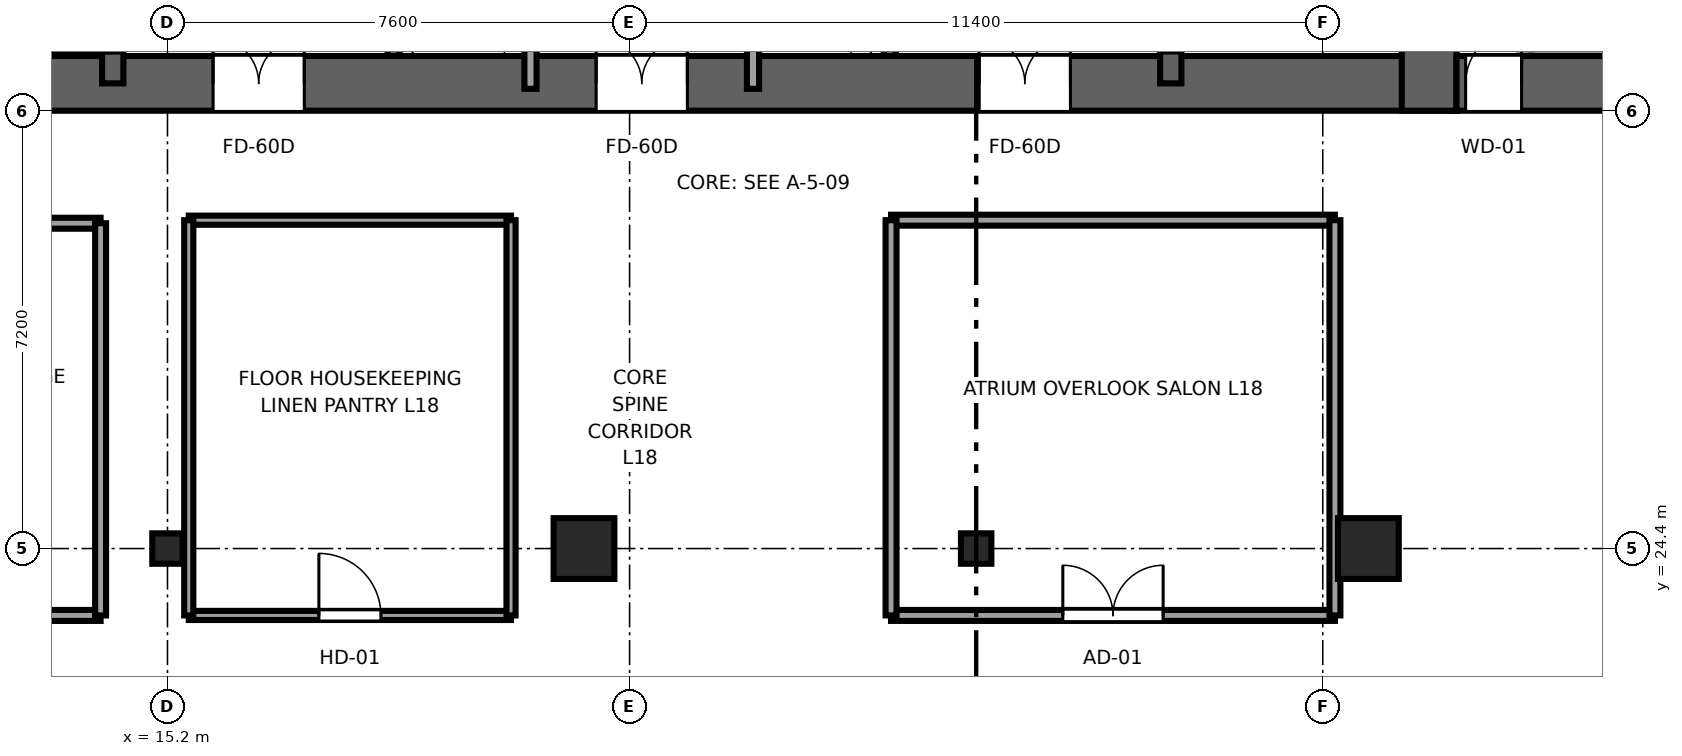
"""IFC4 building model, lengths in metres.
Left out: names, types, materials, properties, quantities, classifications, styles, units other than length and angle.
Written with IfcOpenShell. Run it as: python <this file> out.ifc"""

import sys

from ifc_helpers import new_model, si_unit, direction, frame, frame_2d, origin, origin_2d, place, context, subcontext, project, spatial, rectangle, i_section, extrude, source, transform, mapped, element, fill, save


model = new_model("IFC4")
c1 = context("Model", 3, precision=1e-05, world=origin(), true_north=direction((0.0, 1.0)))
c2 = subcontext(c1, "Body", "Model", "MODEL_VIEW")
j1 = project(units=[si_unit("LENGTHUNIT", "METRE"), si_unit("PLANEANGLEUNIT", "RADIAN")], contexts=[c1])
p1 = place(None, origin())
s1 = spatial("IfcSite", under=j1, at=p1, CompositionType="ELEMENT")
p2 = place(p1, origin())
s2 = spatial("IfcBuilding", under=s1, at=p2, CompositionType="ELEMENT")
p3 = place(p2, frame((0.0, 0.0, 74.6)))
s3 = spatial("IfcBuildingStorey", under=s2, at=p3, CompositionType="ELEMENT", Elevation=74.6)
p4 = place(p3, frame((9.6, 32.05, 0.0), z_axis=(0.0, 0.0, 1.0), x_axis=(1.0, 0.0, 0.0)))
e1 = element("IfcWall", 1, at=p4, inside=s3, PredefinedType="SHEAR", context=c2, shape_type="SweptSolid", body=[
    extrude(rectangle(XDim=26.8, YDim=0.9, at=frame_2d((13.4, 0.0))), origin(), (0.0, 0.0, 1.0), 3.55),
])
p5 = place(p4, frame((7.85, 0.0, 0.0), z_axis=(0.0, 0.0, 1.0), x_axis=(-1.0, 0.0, 0.0)))
e2 = element("IfcOpeningElement", 2, at=p5, cuts=e1, PredefinedType="OPENING", context=c2, shape_type="SweptSolid", body=[
    extrude(rectangle(XDim=1.5, YDim=2.04, at=frame_2d((0.75, 1.02))), frame((0.0, 0.46, 0.0), z_axis=(0.0, -1.0, 0.0), x_axis=(1.0, 0.0, 0.0)), (0.0, 0.0, 1.0), 0.92),
])
p6 = place(p4, frame((14.15, 0.0, 0.0), z_axis=(0.0, 0.0, 1.0), x_axis=(-1.0, 0.0, 0.0)))
e3 = element("IfcOpeningElement", 3, at=p6, cuts=e1, PredefinedType="OPENING", context=c2, shape_type="SweptSolid", body=[
    extrude(rectangle(XDim=1.5, YDim=2.04, at=frame_2d((0.75, 1.02))), frame((0.0, 0.46, 0.0), z_axis=(0.0, -1.0, 0.0), x_axis=(1.0, 0.0, 0.0)), (0.0, 0.0, 1.0), 0.92),
])
p7 = place(p4, frame((20.45, 0.0, 0.0), z_axis=(0.0, 0.0, 1.0), x_axis=(-1.0, 0.0, 0.0)))
e4 = element("IfcOpeningElement", 4, at=p7, cuts=e1, PredefinedType="OPENING", context=c2, shape_type="SweptSolid", body=[
    extrude(rectangle(XDim=1.5, YDim=2.04, at=frame_2d((0.75, 1.02))), frame((0.0, 0.46, 0.0), z_axis=(0.0, -1.0, 0.0), x_axis=(1.0, 0.0, 0.0)), (0.0, 0.0, 1.0), 0.92),
])
p8 = place(p3, frame((35.95, 31.6, 0.0), z_axis=(0.0, 0.0, 1.0), x_axis=(0.0, 1.0, 0.0)))
e5 = element("IfcWall", 5, at=p8, inside=s3, PredefinedType="SHEAR", context=c2, shape_type="SweptSolid", body=[
    extrude(rectangle(XDim=13.6, YDim=0.9, at=frame_2d((6.8, 0.0))), origin(), (0.0, 0.0, 1.0), 3.55),
])
p9 = place(p3, frame((14.3, 32.05, 0.0), z_axis=(0.0, 0.0, 1.0), x_axis=(0.0, 1.0, 0.0)))
e6 = element("IfcWall", 6, at=p9, inside=s3, PredefinedType="SHEAR", context=c2, shape_type="SweptSolid", body=[
    extrude(rectangle(XDim=12.7, YDim=0.35, at=frame_2d((6.35, 0.0))), origin(), (0.0, 0.0, 1.0), 3.55),
])
p10 = place(p9, frame((0.5, 0.0, 0.0)))
e7 = element("IfcOpeningElement", 7, at=p10, cuts=e6, PredefinedType="OPENING", context=c2, shape_type="SweptSolid", body=[
    extrude(rectangle(XDim=1.1, YDim=2.12, at=frame_2d((0.55, 1.06))), frame((0.0, 0.185, 0.0), z_axis=(0.0, -1.0, 0.0), x_axis=(1.0, 0.0, 0.0)), (0.0, 0.0, 1.0), 0.37),
])
p11 = place(p3, frame((31.7, 32.05, 0.0), z_axis=(0.0, 0.0, 1.0), x_axis=(0.0, 1.0, 0.0)))
e8 = element("IfcWall", 8, at=p11, inside=s3, PredefinedType="SHEAR", context=c2, shape_type="SweptSolid", body=[
    extrude(rectangle(XDim=12.7, YDim=0.35, at=frame_2d((6.35, 0.0))), origin(), (0.0, 0.0, 1.0), 3.55),
])
p12 = place(p11, frame((1.6, 0.0, 0.0), z_axis=(0.0, 0.0, 1.0), x_axis=(-1.0, 0.0, 0.0)))
e9 = element("IfcOpeningElement", 9, at=p12, cuts=e8, PredefinedType="OPENING", context=c2, shape_type="SweptSolid", body=[
    extrude(rectangle(XDim=1.1, YDim=2.12, at=frame_2d((0.55, 1.06))), frame((0.0, 0.185, 0.0), z_axis=(0.0, -1.0, 0.0), x_axis=(1.0, 0.0, 0.0)), (0.0, 0.0, 1.0), 0.37),
])
p13 = place(p3, frame((36.4, 32.05, 0.0), z_axis=(0.0, 0.0, 1.0), x_axis=(1.0, 0.0, 0.0)))
e10 = element("IfcWall", 10, at=p13, inside=s3, PredefinedType="SHEAR", context=c2, shape_type="SweptSolid", body=[
    extrude(rectangle(XDim=4.0, YDim=0.9, at=frame_2d((2.0, 0.0))), origin(), (0.0, 0.0, 1.0), 3.55),
])
p14 = place(p13, frame((1.07, 0.0, 0.0), z_axis=(0.0, 0.0, 1.0), x_axis=(-1.0, 0.0, 0.0)))
e11 = element("IfcOpeningElement", 11, at=p14, cuts=e10, PredefinedType="OPENING", context=c2, shape_type="SweptSolid", body=[
    extrude(rectangle(XDim=0.92, YDim=2.01, at=frame_2d((0.46, 1.005))), frame((0.0, 0.46, 0.0), z_axis=(0.0, -1.0, 0.0), x_axis=(1.0, 0.0, 0.0)), (0.0, 0.0, 1.0), 0.92),
])
m1 = source(origin(), c2, "Body", "SweptSolid", [
    extrude(i_section(OverallWidth=0.5, OverallDepth=0.5, WebThickness=0.028, FlangeThickness=0.045, at=origin_2d()), origin(), (0.0, 0.0, 1.0), 3.55),
])
p15 = place(p3, frame((15.2, 24.4, 0.0), z_axis=(0.0, 0.0, 1.0), x_axis=(1.0, 0.0, 0.0)))
e12 = element("IfcColumn", 12, at=p15, inside=s3, PredefinedType="COLUMN", context=c2, shape_type="MappedRepresentation", body=[
    mapped(m1, transform((0.0, 0.0, 0.0), x_axis=(1.0, 0.0, 0.0), y_axis=(0.0, 1.0, 0.0), z_axis=(0.0, 0.0, 1.0), scale=1.0)),
])
m2 = source(origin(), c2, "Body", "SweptSolid", [
    extrude(rectangle(XDim=1.0, YDim=1.0, at=origin_2d()), origin(), (0.0, 0.0, 1.0), 3.55),
])
for number, where, z_axis, x_axis in (
    (13, (22.05, 24.4, 0.0), (0.0, 0.0, 1.0), (1.0, 0.0, 0.0)),
    (14, (34.95, 24.4, 0.0), (0.0, 0.0, 1.0), (1.0, 0.0, 0.0)),
):
    element("IfcColumn", number, at=place(p3, frame(where, z_axis=z_axis, x_axis=x_axis)), inside=s3, PredefinedType="COLUMN", context=c2, shape_type="MappedRepresentation", body=[
        mapped(m2, transform((0.0, 0.0, 0.0), x_axis=(1.0, 0.0, 0.0), y_axis=(0.0, 1.0, 0.0), z_axis=(0.0, 0.0, 1.0), scale=1.0)),
    ])
p16 = place(p3, frame((28.5, 24.4, 0.0), z_axis=(0.0, 0.0, 1.0), x_axis=(1.0, 0.0, 0.0)))
e15 = element("IfcColumn", 15, at=p16, inside=s3, PredefinedType="COLUMN", context=c2, shape_type="MappedRepresentation", body=[
    mapped(m1, transform((0.0, 0.0, 0.0), x_axis=(1.0, 0.0, 0.0), y_axis=(0.0, 1.0, 0.0), z_axis=(0.0, 0.0, 1.0), scale=1.0)),
])
for number, where, z_axis, x_axis in (
    (16, (18.92, 32.504, 0.0), (0.0, 0.0, 1.0), (0.0, 1.0, 0.0)),
    (17, (27.08, 32.504, 0.0), (0.0, 0.0, 1.0), (0.0, 1.0, 0.0)),
):
    element("IfcWall", number, at=place(p3, frame(where, z_axis=z_axis, x_axis=x_axis)), inside=s3, PredefinedType="SOLIDWALL", context=c2, shape_type="SweptSolid", body=[
        extrude(rectangle(XDim=3.646, YDim=0.2, at=frame_2d((1.823, 0.0))), origin(), (0.0, 0.0, 1.0), 3.37),
    ])
for number, where, z_axis, x_axis in (
    (18, (21.17, 31.96, 0.0), (0.0, 0.0, 1.0), (0.0, 1.0, 0.0)),
    (19, (24.83, 31.96, 0.0), (0.0, 0.0, 1.0), (0.0, 1.0, 0.0)),
):
    element("IfcWall", number, at=place(p3, frame(where, z_axis=z_axis, x_axis=x_axis)), inside=s3, PredefinedType="SOLIDWALL", context=c2, shape_type="SweptSolid", body=[
        extrude(rectangle(XDim=12.58, YDim=0.2, at=frame_2d((6.29, 0.0))), origin(), (0.0, 0.0, 1.0), 3.37),
    ])
p17 = place(p3, frame((9.88, 23.3, 0.0), z_axis=(0.0, 0.0, 1.0), x_axis=(1.0, 0.0, 0.0)))
e20 = element("IfcWall", 20, at=p17, inside=s3, PredefinedType="PARTITIONING", context=c2, shape_type="SweptSolid", body=[
    extrude(rectangle(XDim=4.22, YDim=0.18, at=frame_2d((2.11, 0.0))), origin(), (0.0, 0.0, 1.0), 3.37),
])
p18 = place(p17, frame((1.285, 0.0, 0.0)))
e21 = element("IfcOpeningElement", 21, at=p18, cuts=e20, PredefinedType="OPENING", context=c2, shape_type="SweptSolid", body=[
    extrude(rectangle(XDim=1.65, YDim=2.15, at=frame_2d((0.825, 1.075))), frame((0.0, 0.1, 0.0), z_axis=(0.0, -1.0, 0.0), x_axis=(1.0, 0.0, 0.0)), (0.0, 0.0, 1.0), 0.2),
])
p19 = place(p3, frame((9.88, 29.75, 0.0), z_axis=(0.0, 0.0, 1.0), x_axis=(1.0, 0.0, 0.0)))
e22 = element("IfcWall", 22, at=p19, inside=s3, PredefinedType="PARTITIONING", context=c2, shape_type="SweptSolid", body=[
    extrude(rectangle(XDim=4.22, YDim=0.18, at=frame_2d((2.11, 0.0))), origin(), (0.0, 0.0, 1.0), 3.37),
])
p20 = place(p3, frame((14.1, 23.3, 0.0), z_axis=(0.0, 0.0, 1.0), x_axis=(0.0, 1.0, 0.0)))
e23 = element("IfcWall", 23, at=p20, inside=s3, PredefinedType="PARTITIONING", context=c2, shape_type="SweptSolid", body=[
    extrude(rectangle(XDim=6.45, YDim=0.18, at=frame_2d((3.225, 0.0))), origin(), (0.0, 0.0, 1.0), 3.37),
])
p21 = place(p3, frame((27.1, 23.3, 0.0), z_axis=(0.0, 0.0, 1.0), x_axis=(1.0, 0.0, 0.0)))
e24 = element("IfcWall", 24, at=p21, inside=s3, PredefinedType="PARTITIONING", context=c2, shape_type="SweptSolid", body=[
    extrude(rectangle(XDim=7.3, YDim=0.18, at=frame_2d((3.65, 0.0))), origin(), (0.0, 0.0, 1.0), 3.37),
])
p22 = place(p21, frame((2.825, 0.0, 0.0)))
e25 = element("IfcOpeningElement", 25, at=p22, cuts=e24, PredefinedType="OPENING", context=c2, shape_type="SweptSolid", body=[
    extrude(rectangle(XDim=1.65, YDim=2.15, at=frame_2d((0.825, 1.075))), frame((0.0, 0.1, 0.0), z_axis=(0.0, -1.0, 0.0), x_axis=(1.0, 0.0, 0.0)), (0.0, 0.0, 1.0), 0.2),
])
p23 = place(p3, frame((27.1, 29.8, 0.0), z_axis=(0.0, 0.0, 1.0), x_axis=(1.0, 0.0, 0.0)))
e26 = element("IfcWall", 26, at=p23, inside=s3, PredefinedType="PARTITIONING", context=c2, shape_type="SweptSolid", body=[
    extrude(rectangle(XDim=7.3, YDim=0.18, at=frame_2d((3.65, 0.0))), origin(), (0.0, 0.0, 1.0), 3.37),
])
for number, where, z_axis, x_axis in (
    (27, (27.1, 23.3, 0.0), (0.0, 0.0, 1.0), (0.0, 1.0, 0.0)),
    (28, (34.4, 23.3, 0.0), (0.0, 0.0, 1.0), (0.0, 1.0, 0.0)),
):
    element("IfcWall", number, at=place(p3, frame(where, z_axis=z_axis, x_axis=x_axis)), inside=s3, PredefinedType="PARTITIONING", context=c2, shape_type="SweptSolid", body=[
        extrude(rectangle(XDim=6.5, YDim=0.18, at=frame_2d((3.25, 0.0))), origin(), (0.0, 0.0, 1.0), 3.37),
    ])
p24 = place(p3, frame((15.55, 23.3, 0.0), z_axis=(0.0, 0.0, 1.0), x_axis=(1.0, 0.0, 0.0)))
e29 = element("IfcWall", 29, at=p24, inside=s3, PredefinedType="PARTITIONING", context=c2, shape_type="SweptSolid", body=[
    extrude(rectangle(XDim=5.3, YDim=0.15, at=frame_2d((2.65, 0.0))), origin(), (0.0, 0.0, 1.0), 3.37),
])
p25 = place(p24, frame((2.14, 0.0, 0.0)))
e30 = element("IfcOpeningElement", 30, at=p25, cuts=e29, PredefinedType="OPENING", context=c2, shape_type="SweptSolid", body=[
    extrude(rectangle(XDim=1.02, YDim=2.03, at=frame_2d((0.51, 1.015))), frame((0.0, 0.085, 0.0), z_axis=(0.0, -1.0, 0.0), x_axis=(1.0, 0.0, 0.0)), (0.0, 0.0, 1.0), 0.17),
])
p26 = place(p3, frame((15.55, 29.8, 0.0), z_axis=(0.0, 0.0, 1.0), x_axis=(1.0, 0.0, 0.0)))
e31 = element("IfcWall", 31, at=p26, inside=s3, PredefinedType="PARTITIONING", context=c2, shape_type="SweptSolid", body=[
    extrude(rectangle(XDim=5.3, YDim=0.15, at=frame_2d((2.65, 0.0))), origin(), (0.0, 0.0, 1.0), 3.37),
])
for number, where, z_axis, x_axis in (
    (32, (15.55, 23.3, 0.0), (0.0, 0.0, 1.0), (0.0, 1.0, 0.0)),
    (33, (20.85, 23.3, 0.0), (0.0, 0.0, 1.0), (0.0, 1.0, 0.0)),
):
    element("IfcWall", number, at=place(p3, frame(where, z_axis=z_axis, x_axis=x_axis)), inside=s3, PredefinedType="PARTITIONING", context=c2, shape_type="SweptSolid", body=[
        extrude(rectangle(XDim=6.5, YDim=0.15, at=frame_2d((3.25, 0.0))), origin(), (0.0, 0.0, 1.0), 3.37),
    ])
m3 = source(origin(), c2, "Body", "SweptSolid", [
    extrude(rectangle(XDim=1.1, YDim=2.12, at=frame_2d((0.55, 1.06))), frame((0.0, 0.025, 0.0), z_axis=(0.0, -1.0, 0.0), x_axis=(1.0, 0.0, 0.0)), (0.0, 0.0, 1.0), 0.05),
])
p27 = place(p10, origin())
e34 = element("IfcDoor", 34, at=p27, inside=s3, OperationType="SINGLE_SWING_LEFT", PredefinedType="DOOR", context=c2, shape_type="MappedRepresentation", body=[
    mapped(m3, transform((0.0, 0.0, 0.0), x_axis=(1.0, 0.0, 0.0), y_axis=(0.0, 1.0, 0.0), z_axis=(0.0, 0.0, 1.0), scale=1.0)),
])
fill(e7, e34)
p28 = place(p12, origin())
e35 = element("IfcDoor", 35, at=p28, inside=s3, OperationType="SINGLE_SWING_RIGHT", PredefinedType="DOOR", context=c2, shape_type="MappedRepresentation", body=[
    mapped(m3, transform((0.0, 0.0, 0.0), x_axis=(1.0, 0.0, 0.0), y_axis=(0.0, 1.0, 0.0), z_axis=(0.0, 0.0, 1.0), scale=1.0)),
])
fill(e9, e35)
m4 = source(origin(), c2, "Body", "SweptSolid", [
    extrude(rectangle(XDim=1.5, YDim=2.04, at=frame_2d((0.75, 1.02))), frame((0.0, 0.025, 0.0), z_axis=(0.0, -1.0, 0.0), x_axis=(1.0, 0.0, 0.0)), (0.0, 0.0, 1.0), 0.05),
])
p29 = place(p5, origin())
e36 = element("IfcDoor", 36, at=p29, inside=s3, OperationType="DOUBLE_DOOR_SINGLE_SWING", PredefinedType="DOOR", context=c2, shape_type="MappedRepresentation", body=[
    mapped(m4, transform((0.0, 0.0, 0.0), x_axis=(1.0, 0.0, 0.0), y_axis=(0.0, 1.0, 0.0), z_axis=(0.0, 0.0, 1.0), scale=1.0)),
])
fill(e2, e36)
p30 = place(p6, origin())
e37 = element("IfcDoor", 37, at=p30, inside=s3, OperationType="DOUBLE_DOOR_SINGLE_SWING", PredefinedType="DOOR", context=c2, shape_type="MappedRepresentation", body=[
    mapped(m4, transform((0.0, 0.0, 0.0), x_axis=(1.0, 0.0, 0.0), y_axis=(0.0, 1.0, 0.0), z_axis=(0.0, 0.0, 1.0), scale=1.0)),
])
fill(e3, e37)
p31 = place(p7, origin())
e38 = element("IfcDoor", 38, at=p31, inside=s3, OperationType="DOUBLE_DOOR_SINGLE_SWING", PredefinedType="DOOR", context=c2, shape_type="MappedRepresentation", body=[
    mapped(m4, transform((0.0, 0.0, 0.0), x_axis=(1.0, 0.0, 0.0), y_axis=(0.0, 1.0, 0.0), z_axis=(0.0, 0.0, 1.0), scale=1.0)),
])
fill(e4, e38)
m5 = source(origin(), c2, "Body", "SweptSolid", [
    extrude(rectangle(XDim=0.92, YDim=2.01, at=frame_2d((0.46, 1.005))), frame((0.0, 0.025, 0.0), z_axis=(0.0, -1.0, 0.0), x_axis=(1.0, 0.0, 0.0)), (0.0, 0.0, 1.0), 0.05),
])
p32 = place(p14, origin())
e39 = element("IfcDoor", 39, at=p32, inside=s3, OperationType="SINGLE_SWING_RIGHT", PredefinedType="DOOR", context=c2, shape_type="MappedRepresentation", body=[
    mapped(m5, transform((0.0, 0.0, 0.0), x_axis=(1.0, 0.0, 0.0), y_axis=(0.0, 1.0, 0.0), z_axis=(0.0, 0.0, 1.0), scale=1.0)),
])
fill(e11, e39)
m6 = source(origin(), c2, "Body", "SweptSolid", [
    extrude(rectangle(XDim=1.65, YDim=2.15, at=frame_2d((0.825, 1.075))), frame((0.0, 0.025, 0.0), z_axis=(0.0, -1.0, 0.0), x_axis=(1.0, 0.0, 0.0)), (0.0, 0.0, 1.0), 0.05),
])
p33 = place(p22, origin())
e40 = element("IfcDoor", 40, at=p33, inside=s3, OperationType="DOUBLE_DOOR_SINGLE_SWING", PredefinedType="DOOR", context=c2, shape_type="MappedRepresentation", body=[
    mapped(m6, transform((0.0, 0.0, 0.0), x_axis=(1.0, 0.0, 0.0), y_axis=(0.0, 1.0, 0.0), z_axis=(0.0, 0.0, 1.0), scale=1.0)),
])
fill(e25, e40)
m7 = source(origin(), c2, "Body", "SweptSolid", [
    extrude(rectangle(XDim=1.02, YDim=2.03, at=frame_2d((0.51, 1.015))), frame((0.0, 0.025, 0.0), z_axis=(0.0, -1.0, 0.0), x_axis=(1.0, 0.0, 0.0)), (0.0, 0.0, 1.0), 0.05),
])
p34 = place(p25, origin())
e41 = element("IfcDoor", 41, at=p34, inside=s3, OperationType="SINGLE_SWING_LEFT", PredefinedType="DOOR", context=c2, shape_type="MappedRepresentation", body=[
    mapped(m7, transform((0.0, 0.0, 0.0), x_axis=(1.0, 0.0, 0.0), y_axis=(0.0, 1.0, 0.0), z_axis=(0.0, 0.0, 1.0), scale=1.0)),
])
fill(e30, e41)
save(model, sys.argv[1])
